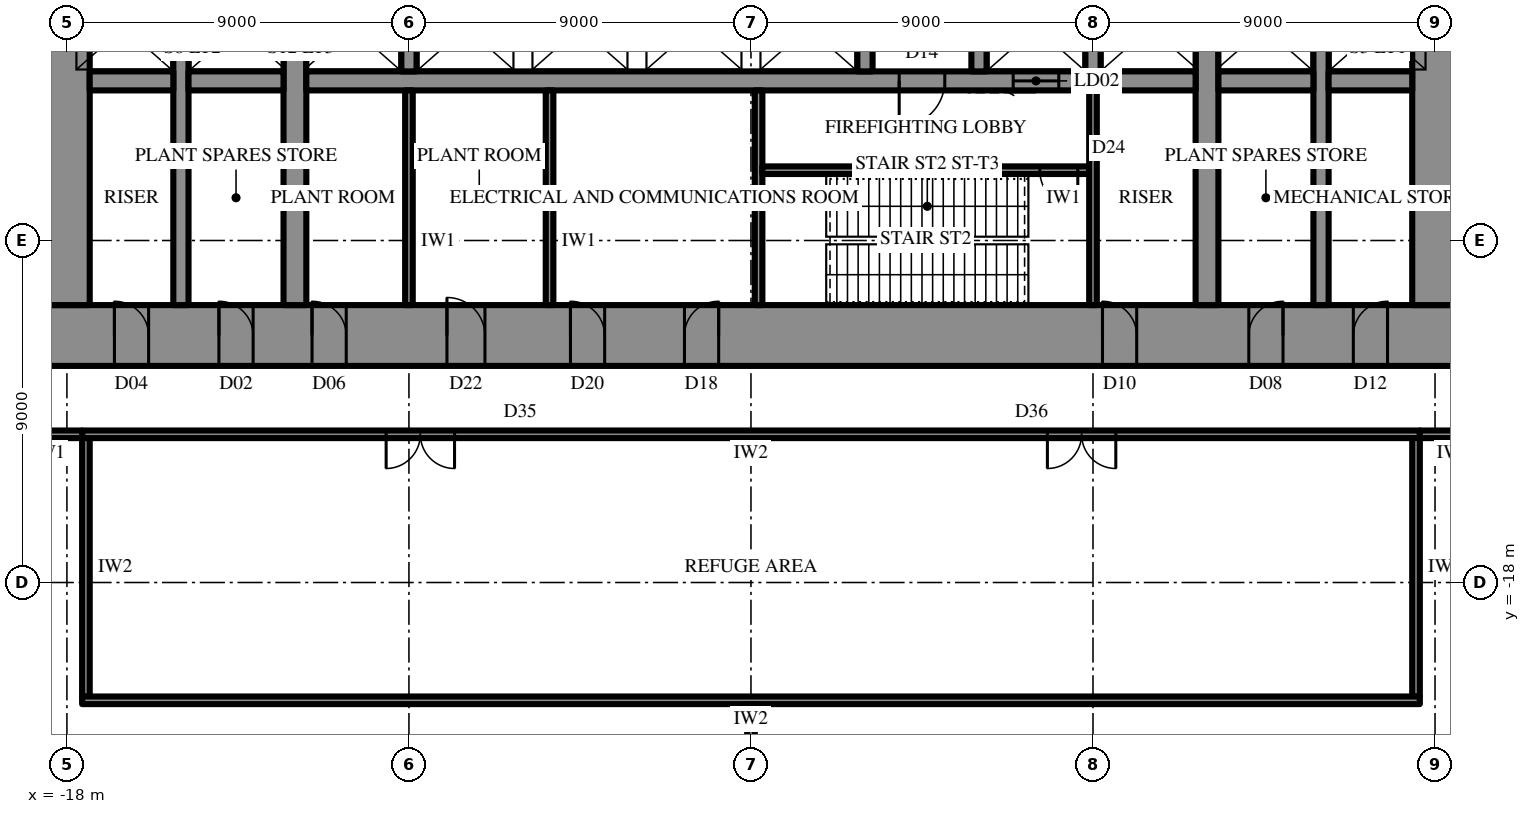
"""IFC4 building model, lengths in metres.
Left out: names, types, materials, properties, quantities, classifications, styles, units other than length and angle.
Written with IfcOpenShell. Run it as: python <this file> out.ifc"""

import sys

from ifc_helpers import new_model, si_unit, direction, frame, frame_2d, origin, place, context, subcontext, project, spatial, rectangle, extrude, element, fill, save


model = new_model("IFC4")
c1 = context("Model", 3, precision=1e-05, world=origin(), true_north=direction((0.0, 1.0)))
c2 = subcontext(c1, "Body", "Model", "MODEL_VIEW")
j1 = project(units=[si_unit("LENGTHUNIT", "METRE"), si_unit("PLANEANGLEUNIT", "RADIAN")], contexts=[c1])
p1 = place(None, origin())
s1 = spatial("IfcSite", under=j1, at=p1, CompositionType="ELEMENT")
p2 = place(p1, origin())
s2 = spatial("IfcBuilding", under=s1, at=p2, CompositionType="ELEMENT")
p3 = place(p2, frame((0.0, 0.0, 107.5)))
s3 = spatial("IfcBuildingStorey", under=s2, at=p3, CompositionType="ELEMENT", Elevation=107.5)
p4 = place(p3, frame((18.6, -11.5, 0.0), z_axis=(0.0, 0.0, 1.0), x_axis=(-1.0, 0.0, 0.0)))
e1 = element("IfcWall", 1, at=p4, inside=s3, PredefinedType="SHEAR", context=c2, shape_type="SweptSolid", body=[
    extrude(rectangle(XDim=37.2, YDim=1.6, at=frame_2d((18.6, 0.0))), origin(), (0.0, 0.0, 1.0), 7.0),
])
p5 = place(p4, frame((19.45, 0.0, 0.0)))
e2 = element("IfcOpeningElement", 2, at=p5, cuts=e1, PredefinedType="OPENING", context=c2, shape_type="SweptSolid", body=[
    extrude(rectangle(XDim=0.9, YDim=2.2, at=frame_2d((0.45, 1.1))), frame((0.0, 0.81, 0.0), z_axis=(0.0, -1.0, 0.0), x_axis=(1.0, 0.0, 0.0)), (0.0, 0.0, 1.0), 1.62),
])
p6 = place(p4, frame((22.45, 0.0, 0.0)))
e3 = element("IfcOpeningElement", 3, at=p6, cuts=e1, PredefinedType="OPENING", context=c2, shape_type="SweptSolid", body=[
    extrude(rectangle(XDim=0.9, YDim=2.2, at=frame_2d((0.45, 1.1))), frame((0.0, 0.81, 0.0), z_axis=(0.0, -1.0, 0.0), x_axis=(1.0, 0.0, 0.0)), (0.0, 0.0, 1.0), 1.62),
])
p7 = place(p4, frame((25.6, 0.0, 0.0)))
e4 = element("IfcOpeningElement", 4, at=p7, cuts=e1, PredefinedType="OPENING", context=c2, shape_type="SweptSolid", body=[
    extrude(rectangle(XDim=1.0, YDim=2.2, at=frame_2d((0.5, 1.1))), frame((0.0, 0.81, 0.0), z_axis=(0.0, -1.0, 0.0), x_axis=(1.0, 0.0, 0.0)), (0.0, 0.0, 1.0), 1.62),
])
p8 = place(p4, frame((1.85, 0.0, 0.0)))
e5 = element("IfcOpeningElement", 5, at=p8, cuts=e1, PredefinedType="OPENING", context=c2, shape_type="SweptSolid", body=[
    extrude(rectangle(XDim=0.9, YDim=2.2, at=frame_2d((0.45, 1.1))), frame((0.0, 0.81, 0.0), z_axis=(0.0, -1.0, 0.0), x_axis=(1.0, 0.0, 0.0)), (0.0, 0.0, 1.0), 1.62),
])
p9 = place(p4, frame((4.6, 0.0, 0.0)))
e6 = element("IfcOpeningElement", 6, at=p9, cuts=e1, PredefinedType="OPENING", context=c2, shape_type="SweptSolid", body=[
    extrude(rectangle(XDim=0.9, YDim=2.2, at=frame_2d((0.45, 1.1))), frame((0.0, 0.81, 0.0), z_axis=(0.0, -1.0, 0.0), x_axis=(1.0, 0.0, 0.0)), (0.0, 0.0, 1.0), 1.62),
])
p10 = place(p4, frame((8.45, 0.0, 0.0)))
e7 = element("IfcOpeningElement", 7, at=p10, cuts=e1, PredefinedType="OPENING", context=c2, shape_type="SweptSolid", body=[
    extrude(rectangle(XDim=0.9, YDim=2.2, at=frame_2d((0.45, 1.1))), frame((0.0, 0.81, 0.0), z_axis=(0.0, -1.0, 0.0), x_axis=(1.0, 0.0, 0.0)), (0.0, 0.0, 1.0), 1.62),
])
p11 = place(p4, frame((29.25, 0.0, 0.0)))
e8 = element("IfcOpeningElement", 8, at=p11, cuts=e1, PredefinedType="OPENING", context=c2, shape_type="SweptSolid", body=[
    extrude(rectangle(XDim=0.9, YDim=2.2, at=frame_2d((0.45, 1.1))), frame((0.0, 0.81, 0.0), z_axis=(0.0, -1.0, 0.0), x_axis=(1.0, 0.0, 0.0)), (0.0, 0.0, 1.0), 1.62),
])
p12 = place(p4, frame((31.7, 0.0, 0.0)))
e9 = element("IfcOpeningElement", 9, at=p12, cuts=e1, PredefinedType="OPENING", context=c2, shape_type="SweptSolid", body=[
    extrude(rectangle(XDim=0.9, YDim=2.2, at=frame_2d((0.45, 1.1))), frame((0.0, 0.81, 0.0), z_axis=(0.0, -1.0, 0.0), x_axis=(1.0, 0.0, 0.0)), (0.0, 0.0, 1.0), 1.62),
])
p13 = place(p4, frame((34.45, 0.0, 0.0)))
e10 = element("IfcOpeningElement", 10, at=p13, cuts=e1, PredefinedType="OPENING", context=c2, shape_type="SweptSolid", body=[
    extrude(rectangle(XDim=0.9, YDim=2.2, at=frame_2d((0.45, 1.1))), frame((0.0, 0.81, 0.0), z_axis=(0.0, -1.0, 0.0), x_axis=(1.0, 0.0, 0.0)), (0.0, 0.0, 1.0), 1.62),
])
p14 = place(p3, frame((18.0, -10.7, 0.0), z_axis=(0.0, 0.0, 1.0), x_axis=(0.0, 1.0, 0.0)))
e11 = element("IfcWall", 11, at=p14, inside=s3, PredefinedType="SHEAR", context=c2, shape_type="SweptSolid", body=[
    extrude(rectangle(XDim=21.4, YDim=1.2, at=frame_2d((10.7, 0.0))), origin(), (0.0, 0.0, 1.0), 7.0),
])
p15 = place(p14, frame((9.8, 0.0, 0.0)))
e12 = element("IfcOpeningElement", 12, at=p15, cuts=e11, PredefinedType="OPENING", context=c2, shape_type="SweptSolid", body=[
    extrude(rectangle(XDim=1.8, YDim=2.4, at=frame_2d((0.9, 1.2))), frame((0.0, 0.61, 0.0), z_axis=(0.0, -1.0, 0.0), x_axis=(1.0, 0.0, 0.0)), (0.0, 0.0, 1.0), 1.22),
])
p16 = place(p3, frame((-18.0, 10.7, 0.0), z_axis=(0.0, 0.0, 1.0), x_axis=(0.0, -1.0, 0.0)))
e13 = element("IfcWall", 13, at=p16, inside=s3, PredefinedType="SHEAR", context=c2, shape_type="SweptSolid", body=[
    extrude(rectangle(XDim=21.4, YDim=1.2, at=frame_2d((10.7, 0.0))), origin(), (0.0, 0.0, 1.0), 7.0),
])
p17 = place(p16, frame((9.8, 0.0, 0.0)))
e14 = element("IfcOpeningElement", 14, at=p17, cuts=e13, PredefinedType="OPENING", context=c2, shape_type="SweptSolid", body=[
    extrude(rectangle(XDim=1.8, YDim=2.4, at=frame_2d((0.9, 1.2))), frame((0.0, 0.61, 0.0), z_axis=(0.0, -1.0, 0.0), x_axis=(1.0, 0.0, 0.0)), (0.0, 0.0, 1.0), 1.22),
])
p18 = place(p3, frame((12.0, -10.7, 0.0), z_axis=(0.0, 0.0, 1.0), x_axis=(0.0, 1.0, 0.0)))
e15 = element("IfcWall", 15, at=p18, inside=s3, PredefinedType="SHEAR", context=c2, shape_type="SweptSolid", body=[
    extrude(rectangle(XDim=21.4, YDim=0.6, at=frame_2d((10.7, 0.0))), origin(), (0.0, 0.0, 1.0), 7.0),
])
p19 = place(p18, frame((9.8, 0.0, 0.0)))
e16 = element("IfcOpeningElement", 16, at=p19, cuts=e15, PredefinedType="OPENING", context=c2, shape_type="SweptSolid", body=[
    extrude(rectangle(XDim=1.8, YDim=2.4, at=frame_2d((0.9, 1.2))), frame((0.0, 0.31, 0.0), z_axis=(0.0, -1.0, 0.0), x_axis=(1.0, 0.0, 0.0)), (0.0, 0.0, 1.0), 0.62),
])
p20 = place(p3, frame((-12.0, -10.7, 0.0), z_axis=(0.0, 0.0, 1.0), x_axis=(0.0, 1.0, 0.0)))
e17 = element("IfcWall", 17, at=p20, inside=s3, PredefinedType="SHEAR", context=c2, shape_type="SweptSolid", body=[
    extrude(rectangle(XDim=21.4, YDim=0.6, at=frame_2d((10.7, 0.0))), origin(), (0.0, 0.0, 1.0), 7.0),
])
p21 = place(p20, frame((9.8, 0.0, 0.0)))
e18 = element("IfcOpeningElement", 18, at=p21, cuts=e17, PredefinedType="OPENING", context=c2, shape_type="SweptSolid", body=[
    extrude(rectangle(XDim=1.8, YDim=2.4, at=frame_2d((0.9, 1.2))), frame((0.0, 0.31, 0.0), z_axis=(0.0, -1.0, 0.0), x_axis=(1.0, 0.0, 0.0)), (0.0, 0.0, 1.0), 0.62),
])
p22 = place(p3, frame((15.0, -10.7, 0.0), z_axis=(0.0, 0.0, 1.0), x_axis=(0.0, 1.0, 0.0)))
e19 = element("IfcWall", 19, at=p22, inside=s3, PredefinedType="SHEAR", context=c2, shape_type="SweptSolid", body=[
    extrude(rectangle(XDim=21.4, YDim=0.4, at=frame_2d((10.7, 0.0))), origin(), (0.0, 0.0, 1.0), 7.0),
])
p23 = place(p22, frame((9.8, 0.0, 0.0)))
e20 = element("IfcOpeningElement", 20, at=p23, cuts=e19, PredefinedType="OPENING", context=c2, shape_type="SweptSolid", body=[
    extrude(rectangle(XDim=1.8, YDim=2.4, at=frame_2d((0.9, 1.2))), frame((0.0, 0.21, 0.0), z_axis=(0.0, -1.0, 0.0), x_axis=(1.0, 0.0, 0.0)), (0.0, 0.0, 1.0), 0.42),
])
p24 = place(p3, frame((-15.0, -10.7, 0.0), z_axis=(0.0, 0.0, 1.0), x_axis=(0.0, 1.0, 0.0)))
e21 = element("IfcWall", 21, at=p24, inside=s3, PredefinedType="SHEAR", context=c2, shape_type="SweptSolid", body=[
    extrude(rectangle(XDim=21.4, YDim=0.4, at=frame_2d((10.7, 0.0))), origin(), (0.0, 0.0, 1.0), 7.0),
])
p25 = place(p24, frame((9.8, 0.0, 0.0)))
e22 = element("IfcOpeningElement", 22, at=p25, cuts=e21, PredefinedType="OPENING", context=c2, shape_type="SweptSolid", body=[
    extrude(rectangle(XDim=1.8, YDim=2.4, at=frame_2d((0.9, 1.2))), frame((0.0, 0.21, 0.0), z_axis=(0.0, -1.0, 0.0), x_axis=(1.0, 0.0, 0.0)), (0.0, 0.0, 1.0), 0.42),
])
p26 = place(p3, frame((17.4, -4.8, 0.0), z_axis=(0.0, 0.0, 1.0), x_axis=(-1.0, 0.0, 0.0)))
e23 = element("IfcWall", 23, at=p26, inside=s3, PredefinedType="SHEAR", context=c2, shape_type="SweptSolid", body=[
    extrude(rectangle(XDim=2.2, YDim=0.5, at=frame_2d((1.1, 0.0))), origin(), (0.0, 0.0, 1.0), 7.0),
])
p27 = place(p3, frame((14.8, -4.8, 0.0), z_axis=(0.0, 0.0, 1.0), x_axis=(-1.0, 0.0, 0.0)))
e24 = element("IfcWall", 24, at=p27, inside=s3, PredefinedType="SHEAR", context=c2, shape_type="SweptSolid", body=[
    extrude(rectangle(XDim=2.5, YDim=0.5, at=frame_2d((1.25, 0.0))), origin(), (0.0, 0.0, 1.0), 7.0),
])
p28 = place(p3, frame((11.7, -4.8, 0.0), z_axis=(0.0, 0.0, 1.0), x_axis=(-1.0, 0.0, 0.0)))
e25 = element("IfcWall", 25, at=p28, inside=s3, PredefinedType="SHEAR", context=c2, shape_type="SweptSolid", body=[
    extrude(rectangle(XDim=23.4, YDim=0.5, at=frame_2d((11.7, 0.0))), origin(), (0.0, 0.0, 1.0), 7.0),
])
p29 = place(p28, frame((6.6, 0.0, 0.0)))
e26 = element("IfcOpeningElement", 26, at=p29, cuts=e25, PredefinedType="OPENING", context=c2, shape_type="SweptSolid", body=[
    extrude(rectangle(XDim=1.2, YDim=2.2, at=frame_2d((0.6, 1.1))), frame((0.0, 0.26, 0.0), z_axis=(0.0, -1.0, 0.0), x_axis=(1.0, 0.0, 0.0)), (0.0, 0.0, 1.0), 0.52),
])
p30 = place(p28, frame((3.6, 0.0, 0.0)))
e27 = element("IfcOpeningElement", 27, at=p30, cuts=e25, PredefinedType="OPENING", context=c2, shape_type="SweptSolid", body=[
    extrude(rectangle(XDim=1.2, YDim=2.2, at=frame_2d((0.6, 1.1))), frame((0.0, 0.26, 0.0), z_axis=(0.0, -1.0, 0.0), x_axis=(1.0, 0.0, 0.0)), (0.0, 0.0, 1.0), 0.52),
])
p31 = place(p3, frame((-12.3, -4.8, 0.0), z_axis=(0.0, 0.0, 1.0), x_axis=(-1.0, 0.0, 0.0)))
e28 = element("IfcWall", 28, at=p31, inside=s3, PredefinedType="SHEAR", context=c2, shape_type="SweptSolid", body=[
    extrude(rectangle(XDim=2.5, YDim=0.5, at=frame_2d((1.25, 0.0))), origin(), (0.0, 0.0, 1.0), 7.0),
])
p32 = place(p3, frame((-15.2, -4.8, 0.0), z_axis=(0.0, 0.0, 1.0), x_axis=(-1.0, 0.0, 0.0)))
e29 = element("IfcWall", 29, at=p32, inside=s3, PredefinedType="SHEAR", context=c2, shape_type="SweptSolid", body=[
    extrude(rectangle(XDim=2.2, YDim=0.5, at=frame_2d((1.1, 0.0))), origin(), (0.0, 0.0, 1.0), 7.0),
])
for number, where, z_axis, x_axis in (
    (30, (9.0, -2.25, 0.0), (0.0, 0.0, 1.0), (0.0, -1.0, 0.0)),
    (31, (6.0, -2.25, 0.0), (0.0, 0.0, 1.0), (0.0, -1.0, 0.0)),
    (32, (3.0, -2.25, 0.0), (0.0, 0.0, 1.0), (0.0, -1.0, 0.0)),
    (33, (-9.0, -2.25, 0.0), (0.0, 0.0, 1.0), (0.0, -1.0, 0.0)),
):
    element("IfcWall", number, at=place(p3, frame(where, z_axis=z_axis, x_axis=x_axis)), inside=s3, PredefinedType="SHEAR", context=c2, shape_type="SweptSolid", body=[
        extrude(rectangle(XDim=2.3, YDim=0.4, at=frame_2d((1.15, 0.0))), origin(), (0.0, 0.0, 1.0), 7.0),
    ])
p33 = place(p3, frame((0.2, -5.05, 0.0), z_axis=(0.0, 0.0, 1.0), x_axis=(0.0, -1.0, 0.0)))
e34 = element("IfcWall", 34, at=p33, inside=s3, PredefinedType="SHEAR", context=c2, shape_type="SweptSolid", body=[
    extrude(rectangle(XDim=5.65, YDim=0.2, at=frame_2d((2.825, 0.0))), origin(), (0.0, 0.0, 1.0), 7.0),
])
p34 = place(p3, frame((8.9, -7.15, 0.0), z_axis=(0.0, 0.0, 1.0), x_axis=(-1.0, 0.0, 0.0)))
e35 = element("IfcWall", 35, at=p34, inside=s3, PredefinedType="SHEAR", context=c2, shape_type="SweptSolid", body=[
    extrude(rectangle(XDim=8.6, YDim=0.2, at=frame_2d((4.3, 0.0))), origin(), (0.0, 0.0, 1.0), 7.0),
])
p35 = place(p34, frame((0.3, 0.0, 0.0)))
e36 = element("IfcOpeningElement", 36, at=p35, cuts=e35, PredefinedType="OPENING", context=c2, shape_type="SweptSolid", body=[
    extrude(rectangle(XDim=1.0, YDim=2.2, at=frame_2d((0.5, 1.1))), frame((0.0, 0.11, 0.0), z_axis=(0.0, -1.0, 0.0), x_axis=(1.0, 0.0, 0.0)), (0.0, 0.0, 1.0), 0.22),
])
for number, where, z_axis, x_axis in (
    (37, (9.0, -5.05, 0.0), (0.0, 0.0, 1.0), (0.0, -1.0, 0.0)),
    (38, (-9.0, -5.05, 0.0), (0.0, 0.0, 1.0), (0.0, -1.0, 0.0)),
    (39, (-5.3, -5.05, 0.0), (0.0, 0.0, 1.0), (0.0, -1.0, 0.0)),
):
    element("IfcWall", number, at=place(p3, frame(where, z_axis=z_axis, x_axis=x_axis)), inside=s3, PredefinedType="PARTITIONING", context=c2, shape_type="SweptSolid", body=[
        extrude(rectangle(XDim=5.65, YDim=0.2, at=frame_2d((2.825, 0.0))), origin(), (0.0, 0.0, 1.0), 6.7),
    ])
p36 = place(p3, frame((17.6, -14.1, 0.0), z_axis=(0.0, 0.0, 1.0), x_axis=(-1.0, 0.0, 0.0)))
e40 = element("IfcWall", 40, at=p36, inside=s3, PredefinedType="PARTITIONING", context=c2, shape_type="SweptSolid", body=[
    extrude(rectangle(XDim=35.2, YDim=0.2, at=frame_2d((17.6, 0.0))), origin(), (0.0, 0.0, 1.0), 6.7),
])
p37 = place(p36, frame((25.4, 0.0, 0.0)))
e41 = element("IfcOpeningElement", 41, at=p37, cuts=e40, PredefinedType="OPENING", context=c2, shape_type="SweptSolid", body=[
    extrude(rectangle(XDim=1.8, YDim=2.1, at=frame_2d((0.9, 1.05))), frame((0.0, 0.11, 0.0), z_axis=(0.0, -1.0, 0.0), x_axis=(1.0, 0.0, 0.0)), (0.0, 0.0, 1.0), 0.22),
])
p38 = place(p36, frame((8.0, 0.0, 0.0)))
e42 = element("IfcOpeningElement", 42, at=p38, cuts=e40, PredefinedType="OPENING", context=c2, shape_type="SweptSolid", body=[
    extrude(rectangle(XDim=1.8, YDim=2.1, at=frame_2d((0.9, 1.05))), frame((0.0, 0.11, 0.0), z_axis=(0.0, -1.0, 0.0), x_axis=(1.0, 0.0, 0.0)), (0.0, 0.0, 1.0), 0.22),
])
for number, where, z_axis, x_axis in (
    (43, (17.5, -14.2, 0.0), (0.0, 0.0, 1.0), (0.0, -1.0, 0.0)),
    (44, (-17.5, -14.2, 0.0), (0.0, 0.0, 1.0), (0.0, -1.0, 0.0)),
):
    element("IfcWall", number, at=place(p3, frame(where, z_axis=z_axis, x_axis=x_axis)), inside=s3, PredefinedType="PARTITIONING", context=c2, shape_type="SweptSolid", body=[
        extrude(rectangle(XDim=6.8, YDim=0.2, at=frame_2d((3.4, 0.0))), origin(), (0.0, 0.0, 1.0), 6.7),
    ])
p39 = place(p3, frame((17.6, -21.1, 0.0), z_axis=(0.0, 0.0, 1.0), x_axis=(-1.0, 0.0, 0.0)))
e45 = element("IfcWall", 45, at=p39, inside=s3, PredefinedType="PARTITIONING", context=c2, shape_type="SweptSolid", body=[
    extrude(rectangle(XDim=35.2, YDim=0.2, at=frame_2d((17.6, 0.0))), origin(), (0.0, 0.0, 1.0), 6.7),
])
for number, where, z_axis, x_axis in (
    (46, (-17.6, -14.1, 0.0), (0.0, 0.0, 1.0), (-1.0, 0.0, 0.0)),
    (47, (19.4, -14.1, 0.0), (0.0, 0.0, 1.0), (-1.0, 0.0, 0.0)),
):
    element("IfcWall", number, at=place(p3, frame(where, z_axis=z_axis, x_axis=x_axis)), inside=s3, PredefinedType="PARTITIONING", context=c2, shape_type="SweptSolid", body=[
        extrude(rectangle(XDim=1.8, YDim=0.2, at=frame_2d((0.9, 0.0))), origin(), (0.0, 0.0, 1.0), 6.7),
    ])
p40 = place(p3, frame((0.0, -21.2, 0.0), z_axis=(0.0, 0.0, 1.0), x_axis=(0.0, -1.0, 0.0)))
e48 = element("IfcWall", 48, at=p40, inside=s3, PredefinedType="PARTITIONING", context=c2, shape_type="SweptSolid", body=[
    extrude(rectangle(XDim=12.61, YDim=0.2, at=frame_2d((6.305, 0.0))), origin(), (0.0, 0.0, 1.0), 2.2),
])
p41 = place(p29, origin())
e49 = element("IfcDoor", 49, at=p41, inside=s3, OperationType="SINGLE_SWING_LEFT", PredefinedType="DOOR", context=c2, shape_type="SweptSolid", body=[
    extrude(rectangle(XDim=1.2, YDim=2.2, at=frame_2d((0.6, 1.1))), frame((0.0, 0.025, 0.0), z_axis=(0.0, -1.0, 0.0), x_axis=(1.0, 0.0, 0.0)), (0.0, 0.0, 1.0), 0.05),
])
fill(e26, e49)
p42 = place(p35, origin())
e50 = element("IfcDoor", 50, at=p42, inside=s3, OperationType="SINGLE_SWING_RIGHT", PredefinedType="DOOR", context=c2, shape_type="SweptSolid", body=[
    extrude(rectangle(XDim=1.0, YDim=2.2, at=frame_2d((0.5, 1.1))), frame((0.0, 0.025, 0.0), z_axis=(0.0, -1.0, 0.0), x_axis=(1.0, 0.0, 0.0)), (0.0, 0.0, 1.0), 0.05),
])
fill(e36, e50)
p43 = place(p5, frame((0.9, 0.0, 0.0), z_axis=(0.0, 0.0, 1.0), x_axis=(-1.0, 0.0, 0.0)))
e51 = element("IfcDoor", 51, at=p43, inside=s3, OperationType="SINGLE_SWING_LEFT", PredefinedType="DOOR", context=c2, shape_type="SweptSolid", body=[
    extrude(rectangle(XDim=0.9, YDim=2.2, at=frame_2d((0.45, 1.1))), frame((0.0, 0.025, 0.0), z_axis=(0.0, -1.0, 0.0), x_axis=(1.0, 0.0, 0.0)), (0.0, 0.0, 1.0), 0.05),
])
fill(e2, e51)
p44 = place(p6, frame((0.9, 0.0, 0.0), z_axis=(0.0, 0.0, 1.0), x_axis=(-1.0, 0.0, 0.0)))
e52 = element("IfcDoor", 52, at=p44, inside=s3, OperationType="SINGLE_SWING_RIGHT", PredefinedType="DOOR", context=c2, shape_type="SweptSolid", body=[
    extrude(rectangle(XDim=0.9, YDim=2.2, at=frame_2d((0.45, 1.1))), frame((0.0, 0.025, 0.0), z_axis=(0.0, -1.0, 0.0), x_axis=(1.0, 0.0, 0.0)), (0.0, 0.0, 1.0), 0.05),
])
fill(e3, e52)
p45 = place(p7, frame((1.0, 0.0, 0.0), z_axis=(0.0, 0.0, 1.0), x_axis=(-1.0, 0.0, 0.0)))
e53 = element("IfcDoor", 53, at=p45, inside=s3, OperationType="SINGLE_SWING_RIGHT", PredefinedType="DOOR", context=c2, shape_type="SweptSolid", body=[
    extrude(rectangle(XDim=1.0, YDim=2.2, at=frame_2d((0.5, 1.1))), frame((0.0, 0.025, 0.0), z_axis=(0.0, -1.0, 0.0), x_axis=(1.0, 0.0, 0.0)), (0.0, 0.0, 1.0), 0.05),
])
fill(e4, e53)
p46 = place(p8, frame((0.9, 0.0, 0.0), z_axis=(0.0, 0.0, 1.0), x_axis=(-1.0, 0.0, 0.0)))
e54 = element("IfcDoor", 54, at=p46, inside=s3, OperationType="SINGLE_SWING_LEFT", PredefinedType="DOOR", context=c2, shape_type="SweptSolid", body=[
    extrude(rectangle(XDim=0.9, YDim=2.2, at=frame_2d((0.45, 1.1))), frame((0.0, 0.025, 0.0), z_axis=(0.0, -1.0, 0.0), x_axis=(1.0, 0.0, 0.0)), (0.0, 0.0, 1.0), 0.05),
])
fill(e5, e54)
p47 = place(p9, frame((0.9, 0.0, 0.0), z_axis=(0.0, 0.0, 1.0), x_axis=(-1.0, 0.0, 0.0)))
e55 = element("IfcDoor", 55, at=p47, inside=s3, OperationType="SINGLE_SWING_LEFT", PredefinedType="DOOR", context=c2, shape_type="SweptSolid", body=[
    extrude(rectangle(XDim=0.9, YDim=2.2, at=frame_2d((0.45, 1.1))), frame((0.0, 0.025, 0.0), z_axis=(0.0, -1.0, 0.0), x_axis=(1.0, 0.0, 0.0)), (0.0, 0.0, 1.0), 0.05),
])
fill(e6, e55)
p48 = place(p10, frame((0.9, 0.0, 0.0), z_axis=(0.0, 0.0, 1.0), x_axis=(-1.0, 0.0, 0.0)))
e56 = element("IfcDoor", 56, at=p48, inside=s3, OperationType="SINGLE_SWING_RIGHT", PredefinedType="DOOR", context=c2, shape_type="SweptSolid", body=[
    extrude(rectangle(XDim=0.9, YDim=2.2, at=frame_2d((0.45, 1.1))), frame((0.0, 0.025, 0.0), z_axis=(0.0, -1.0, 0.0), x_axis=(1.0, 0.0, 0.0)), (0.0, 0.0, 1.0), 0.05),
])
fill(e7, e56)
p49 = place(p11, frame((0.9, 0.0, 0.0), z_axis=(0.0, 0.0, 1.0), x_axis=(-1.0, 0.0, 0.0)))
e57 = element("IfcDoor", 57, at=p49, inside=s3, OperationType="SINGLE_SWING_RIGHT", PredefinedType="DOOR", context=c2, shape_type="SweptSolid", body=[
    extrude(rectangle(XDim=0.9, YDim=2.2, at=frame_2d((0.45, 1.1))), frame((0.0, 0.025, 0.0), z_axis=(0.0, -1.0, 0.0), x_axis=(1.0, 0.0, 0.0)), (0.0, 0.0, 1.0), 0.05),
])
fill(e8, e57)
p50 = place(p12, frame((0.9, 0.0, 0.0), z_axis=(0.0, 0.0, 1.0), x_axis=(-1.0, 0.0, 0.0)))
e58 = element("IfcDoor", 58, at=p50, inside=s3, OperationType="SINGLE_SWING_RIGHT", PredefinedType="DOOR", context=c2, shape_type="SweptSolid", body=[
    extrude(rectangle(XDim=0.9, YDim=2.2, at=frame_2d((0.45, 1.1))), frame((0.0, 0.025, 0.0), z_axis=(0.0, -1.0, 0.0), x_axis=(1.0, 0.0, 0.0)), (0.0, 0.0, 1.0), 0.05),
])
fill(e9, e58)
p51 = place(p13, frame((0.9, 0.0, 0.0), z_axis=(0.0, 0.0, 1.0), x_axis=(-1.0, 0.0, 0.0)))
e59 = element("IfcDoor", 59, at=p51, inside=s3, OperationType="SINGLE_SWING_RIGHT", PredefinedType="DOOR", context=c2, shape_type="SweptSolid", body=[
    extrude(rectangle(XDim=0.9, YDim=2.2, at=frame_2d((0.45, 1.1))), frame((0.0, 0.025, 0.0), z_axis=(0.0, -1.0, 0.0), x_axis=(1.0, 0.0, 0.0)), (0.0, 0.0, 1.0), 0.05),
])
fill(e10, e59)
p52 = place(p30, origin())
e60 = element("IfcDoor", 60, at=p52, inside=s3, OperationType="SLIDING_TO_LEFT", PredefinedType="DOOR", context=c2, shape_type="SweptSolid", body=[
    extrude(rectangle(XDim=1.2, YDim=2.2, at=frame_2d((0.6, 1.1))), frame((0.0, 0.025, 0.0), z_axis=(0.0, -1.0, 0.0), x_axis=(1.0, 0.0, 0.0)), (0.0, 0.0, 1.0), 0.05),
])
fill(e27, e60)
p53 = place(p37, origin())
e61 = element("IfcDoor", 61, at=p53, inside=s3, OperationType="DOUBLE_DOOR_SINGLE_SWING", PredefinedType="DOOR", context=c2, shape_type="SweptSolid", body=[
    extrude(rectangle(XDim=1.8, YDim=2.1, at=frame_2d((0.9, 1.05))), frame((0.0, 0.025, 0.0), z_axis=(0.0, -1.0, 0.0), x_axis=(1.0, 0.0, 0.0)), (0.0, 0.0, 1.0), 0.05),
])
fill(e41, e61)
p54 = place(p38, origin())
e62 = element("IfcDoor", 62, at=p54, inside=s3, OperationType="DOUBLE_DOOR_SINGLE_SWING", PredefinedType="DOOR", context=c2, shape_type="SweptSolid", body=[
    extrude(rectangle(XDim=1.8, YDim=2.1, at=frame_2d((0.9, 1.05))), frame((0.0, 0.025, 0.0), z_axis=(0.0, -1.0, 0.0), x_axis=(1.0, 0.0, 0.0)), (0.0, 0.0, 1.0), 0.05),
])
fill(e42, e62)
save(model, sys.argv[1])
